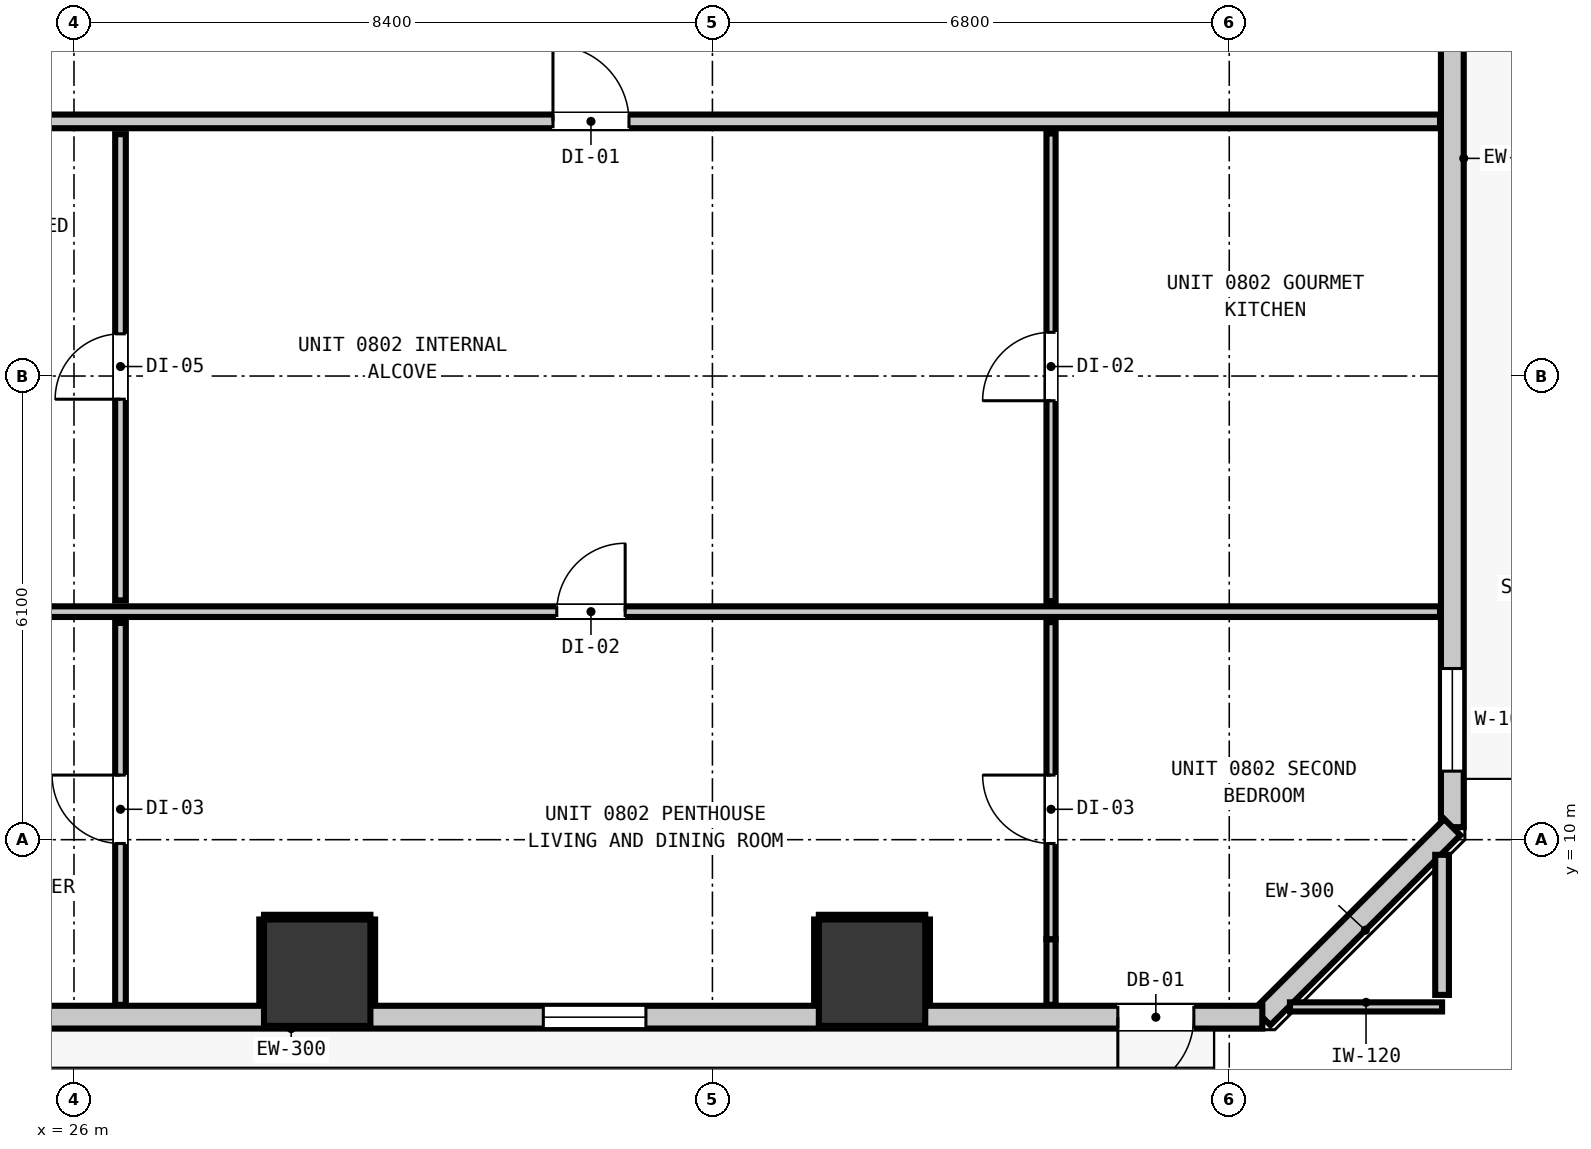
"""IFC4 building model, lengths in metres.
Left out: names, types, materials, properties, quantities, classifications, styles, units other than length and angle.
Written with IfcOpenShell. Run it as: python <this file> out.ifc"""

import sys

from ifc_helpers import new_model, si_unit, direction, frame, frame_2d, origin, origin_2d, place, context, subcontext, project, spatial, rectangle, extrude, element, fill, save


model = new_model("IFC4")
c1 = context("Model", 3, precision=1e-05, world=origin(), true_north=direction((0.0, 1.0)))
c2 = subcontext(c1, "Body", "Model", "MODEL_VIEW")
j1 = project(units=[si_unit("LENGTHUNIT", "METRE"), si_unit("PLANEANGLEUNIT", "RADIAN")], contexts=[c1])
p1 = place(None, origin())
s1 = spatial("IfcSite", under=j1, at=p1, CompositionType="ELEMENT")
p2 = place(p1, origin())
s2 = spatial("IfcBuilding", under=s1, at=p2, CompositionType="ELEMENT")
p3 = place(p2, frame((0.0, 0.0, 31.96)))
s3 = spatial("IfcBuildingStorey", under=s2, at=p3, CompositionType="ELEMENT", Elevation=31.96)
for number, where, z_axis, x_axis in (
    (1, (29.2, 8.25, 0.0), (0.0, 0.0, 1.0), (1.0, 0.0, 0.0)),
    (2, (36.5, 8.25, 0.0), (0.0, 0.0, 1.0), (1.0, 0.0, 0.0)),
):
    element("IfcColumn", number, at=place(p3, frame(where, z_axis=z_axis, x_axis=x_axis)), inside=s3, PredefinedType="COLUMN", context=c2, shape_type="SweptSolid", body=[
        extrude(rectangle(XDim=1.4, YDim=1.4, at=origin_2d()), origin(), (0.0, 0.0, 1.0), 3.32),
    ])
p4 = place(p3, frame((44.135, 44.835, 0.0), z_axis=(0.0, 0.0, 1.0), x_axis=(0.0, -1.0, 0.0)))
e3 = element("IfcWall", 3, at=p4, inside=s3, PredefinedType="STANDARD", context=c2, shape_type="SweptSolid", body=[
    extrude(rectangle(XDim=34.67, YDim=0.3, at=frame_2d((17.335, 0.0))), origin(), (0.0, 0.0, 1.0), 3.06),
])
p5 = place(p4, frame((1.251, 0.0, 0.0)))
e4 = element("IfcOpeningElement", 4, at=p5, cuts=e3, PredefinedType="OPENING", context=c2, shape_type="SweptSolid", body=[
    extrude(rectangle(XDim=1.0, YDim=2.15, at=frame_2d((0.5, 1.075))), frame((0.0, 0.16, 0.0), z_axis=(0.0, -1.0, 0.0), x_axis=(1.0, 0.0, 0.0)), (0.0, 0.0, 1.0), 0.32),
])
p6 = place(p4, frame((32.583, 0.0, 0.85)))
e5 = element("IfcOpeningElement", 5, at=p6, cuts=e3, PredefinedType="OPENING", context=c2, shape_type="SweptSolid", body=[
    extrude(rectangle(XDim=1.35, YDim=1.85, at=frame_2d((0.675, 0.925))), frame((0.0, 0.16, 0.0), z_axis=(0.0, -1.0, 0.0), x_axis=(1.0, 0.0, 0.0)), (0.0, 0.0, 1.0), 0.32),
])
p7 = place(p4, frame((17.81, 0.0, 0.85)))
e6 = element("IfcOpeningElement", 6, at=p7, cuts=e3, PredefinedType="OPENING", context=c2, shape_type="SweptSolid", body=[
    extrude(rectangle(XDim=1.35, YDim=1.85, at=frame_2d((0.675, 0.925))), frame((0.0, 0.16, 0.0), z_axis=(0.0, -1.0, 0.0), x_axis=(1.0, 0.0, 0.0)), (0.0, 0.0, 1.0), 0.32),
])
p8 = place(p4, frame((6.834, 0.0, 0.85)))
e7 = element("IfcOpeningElement", 7, at=p8, cuts=e3, PredefinedType="OPENING", context=c2, shape_type="SweptSolid", body=[
    extrude(rectangle(XDim=1.35, YDim=1.85, at=frame_2d((0.675, 0.925))), frame((0.0, 0.16, 0.0), z_axis=(0.0, -1.0, 0.0), x_axis=(1.0, 0.0, 0.0)), (0.0, 0.0, 1.0), 0.32),
])
p9 = place(p3, frame((44.135, 10.165, 0.0), z_axis=(0.0, 0.0, 1.0), x_axis=(-0.707106781187, -0.707106781187, 0.0)))
e8 = element("IfcWall", 8, at=p9, inside=s3, PredefinedType="STANDARD", context=c2, shape_type="SweptSolid", body=[
    extrude(rectangle(XDim=3.536, YDim=0.3, at=frame_2d((1.768, 0.0))), origin(), (0.0, 0.0, 1.0), 3.06),
])
p10 = place(p3, frame((41.635, 7.665, 0.0), z_axis=(0.0, 0.0, 1.0), x_axis=(-1.0, 0.0, 0.0)))
e9 = element("IfcWall", 9, at=p10, inside=s3, PredefinedType="STANDARD", context=c2, shape_type="SweptSolid", body=[
    extrude(rectangle(XDim=37.47, YDim=0.3, at=frame_2d((18.735, 0.0))), origin(), (0.0, 0.0, 1.0), 3.06),
])
p11 = place(p10, frame((0.901, 0.0, 0.0)))
e10 = element("IfcOpeningElement", 10, at=p11, cuts=e9, PredefinedType="OPENING", context=c2, shape_type="SweptSolid", body=[
    extrude(rectangle(XDim=1.0, YDim=2.15, at=frame_2d((0.5, 1.075))), frame((0.0, 0.16, 0.0), z_axis=(0.0, -1.0, 0.0), x_axis=(1.0, 0.0, 0.0)), (0.0, 0.0, 1.0), 0.32),
])
p12 = place(p10, frame((32.47, 0.0, 0.85)))
e11 = element("IfcOpeningElement", 11, at=p12, cuts=e9, PredefinedType="OPENING", context=c2, shape_type="SweptSolid", body=[
    extrude(rectangle(XDim=1.35, YDim=1.85, at=frame_2d((0.675, 0.925))), frame((0.0, 0.16, 0.0), z_axis=(0.0, -1.0, 0.0), x_axis=(1.0, 0.0, 0.0)), (0.0, 0.0, 1.0), 0.32),
])
p13 = place(p10, frame((36.621, 0.0, 0.85)))
e12 = element("IfcOpeningElement", 12, at=p13, cuts=e9, PredefinedType="OPENING", context=c2, shape_type="SweptSolid", body=[
    extrude(rectangle(XDim=0.58, YDim=1.5, at=frame_2d((0.29, 0.75))), frame((0.0, 0.16, 0.0), z_axis=(0.0, -1.0, 0.0), x_axis=(1.0, 0.0, 0.0)), (0.0, 0.0, 1.0), 0.32),
])
p14 = place(p10, frame((25.17, 0.0, 0.85)))
e13 = element("IfcOpeningElement", 13, at=p14, cuts=e9, PredefinedType="OPENING", context=c2, shape_type="SweptSolid", body=[
    extrude(rectangle(XDim=1.35, YDim=1.85, at=frame_2d((0.675, 0.925))), frame((0.0, 0.16, 0.0), z_axis=(0.0, -1.0, 0.0), x_axis=(1.0, 0.0, 0.0)), (0.0, 0.0, 1.0), 0.32),
])
p15 = place(p10, frame((22.07, 0.0, 0.85)))
e14 = element("IfcOpeningElement", 14, at=p15, cuts=e9, PredefinedType="OPENING", context=c2, shape_type="SweptSolid", body=[
    extrude(rectangle(XDim=1.35, YDim=1.85, at=frame_2d((0.675, 0.925))), frame((0.0, 0.16, 0.0), z_axis=(0.0, -1.0, 0.0), x_axis=(1.0, 0.0, 0.0)), (0.0, 0.0, 1.0), 0.32),
])
p16 = place(p10, frame((8.11, 0.0, 0.85)))
e15 = element("IfcOpeningElement", 15, at=p16, cuts=e9, PredefinedType="OPENING", context=c2, shape_type="SweptSolid", body=[
    extrude(rectangle(XDim=1.35, YDim=1.85, at=frame_2d((0.675, 0.925))), frame((0.0, 0.16, 0.0), z_axis=(0.0, -1.0, 0.0), x_axis=(1.0, 0.0, 0.0)), (0.0, 0.0, 1.0), 0.32),
])
p17 = place(p10, frame((16.094, 0.0, 0.85)))
e16 = element("IfcOpeningElement", 16, at=p17, cuts=e9, PredefinedType="OPENING", context=c2, shape_type="SweptSolid", body=[
    extrude(rectangle(XDim=1.35, YDim=1.85, at=frame_2d((0.675, 0.925))), frame((0.0, 0.16, 0.0), z_axis=(0.0, -1.0, 0.0), x_axis=(1.0, 0.0, 0.0)), (0.0, 0.0, 1.0), 0.32),
])
p18 = place(p3, frame((1.827, 19.45, 0.0), z_axis=(0.0, 0.0, 1.0), x_axis=(1.0, 0.0, 0.0)))
e17 = element("IfcWall", 17, at=p18, inside=s3, PredefinedType="PARTITIONING", context=c2, shape_type="SweptSolid", body=[
    extrude(rectangle(XDim=42.146, YDim=0.18, at=frame_2d((21.073, 0.0))), origin(), (0.0, 0.0, 1.0), 3.06),
])
p19 = place(p18, frame((8.602, 0.0, 0.0)))
e18 = element("IfcOpeningElement", 18, at=p19, cuts=e17, PredefinedType="OPENING", context=c2, shape_type="SweptSolid", body=[
    extrude(rectangle(XDim=1.0, YDim=2.15, at=frame_2d((0.5, 1.075))), frame((0.0, 0.1, 0.0), z_axis=(0.0, -1.0, 0.0), x_axis=(1.0, 0.0, 0.0)), (0.0, 0.0, 1.0), 0.2),
])
p20 = place(p18, frame((30.475, 0.0, 0.0)))
e19 = element("IfcOpeningElement", 19, at=p20, cuts=e17, PredefinedType="OPENING", context=c2, shape_type="SweptSolid", body=[
    extrude(rectangle(XDim=1.0, YDim=2.15, at=frame_2d((0.5, 1.075))), frame((0.0, 0.1, 0.0), z_axis=(0.0, -1.0, 0.0), x_axis=(1.0, 0.0, 0.0)), (0.0, 0.0, 1.0), 0.2),
])
p21 = place(p3, frame((11.688, 13.0, 0.0), z_axis=(0.0, 0.0, 1.0), x_axis=(1.0, 0.0, 0.0)))
e20 = element("IfcWall", 20, at=p21, inside=s3, PredefinedType="PARTITIONING", context=c2, shape_type="SweptSolid", body=[
    extrude(rectangle(XDim=32.285, YDim=0.14, at=frame_2d((16.143, 0.0))), origin(), (0.0, 0.0, 1.0), 3.06),
])
p22 = place(p21, frame((20.664, 0.0, 0.0)))
e21 = element("IfcOpeningElement", 21, at=p22, cuts=e20, PredefinedType="OPENING", context=c2, shape_type="SweptSolid", body=[
    extrude(rectangle(XDim=0.9, YDim=2.1, at=frame_2d((0.45, 1.05))), frame((0.0, 0.08, 0.0), z_axis=(0.0, -1.0, 0.0), x_axis=(1.0, 0.0, 0.0)), (0.0, 0.0, 1.0), 0.16),
])
p23 = place(p3, frame((41.999, 7.8, 0.0), z_axis=(0.0, 0.0, 1.0), x_axis=(1.0, 0.0, 0.0)))
e22 = element("IfcWall", 22, at=p23, inside=s3, PredefinedType="PARTITIONING", context=c2, shape_type="SweptSolid", body=[
    extrude(rectangle(XDim=2.001, YDim=0.12, at=frame_2d((1.0, 0.0))), origin(), (0.0, 0.0, 1.0), 3.06),
])
p24 = place(p3, frame((44.0, 7.958, 0.0), z_axis=(0.0, 0.0, 1.0), x_axis=(0.0, 1.0, 0.0)))
e23 = element("IfcWall", 23, at=p24, inside=s3, PredefinedType="PARTITIONING", context=c2, shape_type="SweptSolid", body=[
    extrude(rectangle(XDim=1.843, YDim=0.18, at=frame_2d((0.921, 0.0))), origin(), (0.0, 0.0, 1.0), 3.06),
])
p25 = place(p3, frame((26.612, 7.827, 0.0), z_axis=(0.0, 0.0, 1.0), x_axis=(0.0, 1.0, 0.0)))
e24 = element("IfcWall", 24, at=p25, inside=s3, PredefinedType="PARTITIONING", context=c2, shape_type="SweptSolid", body=[
    extrude(rectangle(XDim=5.025, YDim=0.14, at=frame_2d((2.513, 0.0))), origin(), (0.0, 0.0, 1.0), 3.06),
])
p26 = place(p25, frame((2.123, 0.0, 0.0)))
e25 = element("IfcOpeningElement", 25, at=p26, cuts=e24, PredefinedType="OPENING", context=c2, shape_type="SweptSolid", body=[
    extrude(rectangle(XDim=0.9, YDim=2.1, at=frame_2d((0.45, 1.05))), frame((0.0, 0.08, 0.0), z_axis=(0.0, -1.0, 0.0), x_axis=(1.0, 0.0, 0.0)), (0.0, 0.0, 1.0), 0.16),
])
p27 = place(p3, frame((26.612, 13.148, 0.0), z_axis=(0.0, 0.0, 1.0), x_axis=(0.0, 1.0, 0.0)))
e26 = element("IfcWall", 26, at=p27, inside=s3, PredefinedType="PARTITIONING", context=c2, shape_type="SweptSolid", body=[
    extrude(rectangle(XDim=6.134, YDim=0.14, at=frame_2d((3.067, 0.0))), origin(), (0.0, 0.0, 1.0), 3.06),
])
p28 = place(p27, frame((2.647, 0.0, 0.0)))
e27 = element("IfcOpeningElement", 27, at=p28, cuts=e26, PredefinedType="OPENING", context=c2, shape_type="SweptSolid", body=[
    extrude(rectangle(XDim=0.86, YDim=2.02, at=frame_2d((0.43, 1.01))), frame((0.0, 0.08, 0.0), z_axis=(0.0, -1.0, 0.0), x_axis=(1.0, 0.0, 0.0)), (0.0, 0.0, 1.0), 0.16),
])
p29 = place(p3, frame((38.855, 7.827, 0.0), z_axis=(0.0, 0.0, 1.0), x_axis=(0.0, 1.0, 0.0)))
e28 = element("IfcWall", 28, at=p29, inside=s3, PredefinedType="PARTITIONING", context=c2, shape_type="SweptSolid", body=[
    extrude(rectangle(XDim=0.864, YDim=0.12, at=frame_2d((0.432, 0.0))), origin(), (0.0, 0.0, 1.0), 3.06),
])
p30 = place(p3, frame((38.855, 8.691, 0.0), z_axis=(0.0, 0.0, 1.0), x_axis=(0.0, 1.0, 0.0)))
e29 = element("IfcWall", 29, at=p30, inside=s3, PredefinedType="PARTITIONING", context=c2, shape_type="SweptSolid", body=[
    extrude(rectangle(XDim=4.171, YDim=0.12, at=frame_2d((2.085, 0.0))), origin(), (0.0, 0.0, 1.0), 2.445),
])
p31 = place(p30, frame((1.259, 0.0, 0.0)))
e30 = element("IfcOpeningElement", 30, at=p31, cuts=e29, PredefinedType="OPENING", context=c2, shape_type="SweptSolid", body=[
    extrude(rectangle(XDim=0.9, YDim=2.1, at=frame_2d((0.45, 1.05))), frame((0.0, 0.07, 0.0), z_axis=(0.0, -1.0, 0.0), x_axis=(1.0, 0.0, 0.0)), (0.0, 0.0, 1.0), 0.14),
])
p32 = place(p3, frame((38.855, 13.138, 0.0), z_axis=(0.0, 0.0, 1.0), x_axis=(0.0, 1.0, 0.0)))
e31 = element("IfcWall", 31, at=p32, inside=s3, PredefinedType="PARTITIONING", context=c2, shape_type="SweptSolid", body=[
    extrude(rectangle(XDim=6.154, YDim=0.12, at=frame_2d((3.077, 0.0))), origin(), (0.0, 0.0, 1.0), 2.445),
])
p33 = place(p32, frame((2.637, 0.0, 0.0)))
e32 = element("IfcOpeningElement", 32, at=p33, cuts=e31, PredefinedType="OPENING", context=c2, shape_type="SweptSolid", body=[
    extrude(rectangle(XDim=0.9, YDim=2.1, at=frame_2d((0.45, 1.05))), frame((0.0, 0.07, 0.0), z_axis=(0.0, -1.0, 0.0), x_axis=(1.0, 0.0, 0.0)), (0.0, 0.0, 1.0), 0.14),
])
p34 = place(p3, frame((28.5, 8.982, 0.0), z_axis=(0.0, 0.0, 1.0), x_axis=(1.0, 0.0, 0.0)))
e33 = element("IfcWall", 33, at=p34, inside=s3, PredefinedType="PARTITIONING", context=c2, shape_type="SweptSolid", body=[
    extrude(rectangle(XDim=1.4, YDim=0.06, at=frame_2d((0.7, 0.0))), origin(), (0.0, 0.0, 1.0), 1.45),
])
for number, where, z_axis, x_axis in (
    (34, (28.468, 7.83, 0.0), (0.0, 0.0, 1.0), (0.0, 1.0, 0.0)),
    (35, (29.932, 7.83, 0.0), (0.0, 0.0, 1.0), (0.0, 1.0, 0.0)),
):
    element("IfcWall", number, at=place(p3, frame(where, z_axis=z_axis, x_axis=x_axis)), inside=s3, PredefinedType="PARTITIONING", context=c2, shape_type="SweptSolid", body=[
        extrude(rectangle(XDim=1.12, YDim=0.06, at=frame_2d((0.56, 0.0))), origin(), (0.0, 0.0, 1.0), 1.45),
    ])
p35 = place(p3, frame((35.8, 8.982, 0.0), z_axis=(0.0, 0.0, 1.0), x_axis=(1.0, 0.0, 0.0)))
e36 = element("IfcWall", 36, at=p35, inside=s3, PredefinedType="PARTITIONING", context=c2, shape_type="SweptSolid", body=[
    extrude(rectangle(XDim=1.4, YDim=0.06, at=frame_2d((0.7, 0.0))), origin(), (0.0, 0.0, 1.0), 1.45),
])
for number, where, z_axis, x_axis in (
    (37, (35.768, 7.83, 0.0), (0.0, 0.0, 1.0), (0.0, 1.0, 0.0)),
    (38, (37.232, 7.83, 0.0), (0.0, 0.0, 1.0), (0.0, 1.0, 0.0)),
):
    element("IfcWall", number, at=place(p3, frame(where, z_axis=z_axis, x_axis=x_axis)), inside=s3, PredefinedType="PARTITIONING", context=c2, shape_type="SweptSolid", body=[
        extrude(rectangle(XDim=1.12, YDim=0.06, at=frame_2d((0.56, 0.0))), origin(), (0.0, 0.0, 1.0), 1.45),
    ])
p36 = place(p11, origin())
e39 = element("IfcDoor", 39, at=p36, inside=s3, OperationType="SINGLE_SWING_RIGHT", PredefinedType="DOOR", context=c2, shape_type="SweptSolid", body=[
    extrude(rectangle(XDim=1.0, YDim=2.15, at=frame_2d((0.5, 1.075))), frame((0.0, 0.025, 0.0), z_axis=(0.0, -1.0, 0.0), x_axis=(1.0, 0.0, 0.0)), (0.0, 0.0, 1.0), 0.05),
])
fill(e10, e39)
p37 = place(p6, origin())
e40 = element("IfcWindow", 40, at=p37, inside=s3, PartitioningType="SINGLE_PANEL", PredefinedType="WINDOW", context=c2, shape_type="SweptSolid", body=[
    extrude(rectangle(XDim=1.35, YDim=1.85, at=frame_2d((0.675, 0.925))), frame((0.0, 0.03, 0.0), z_axis=(0.0, -1.0, 0.0), x_axis=(1.0, 0.0, 0.0)), (0.0, 0.0, 1.0), 0.06),
])
fill(e5, e40)
p38 = place(p16, origin())
e41 = element("IfcWindow", 41, at=p38, inside=s3, PartitioningType="SINGLE_PANEL", PredefinedType="WINDOW", context=c2, shape_type="SweptSolid", body=[
    extrude(rectangle(XDim=1.35, YDim=1.85, at=frame_2d((0.675, 0.925))), frame((0.0, 0.03, 0.0), z_axis=(0.0, -1.0, 0.0), x_axis=(1.0, 0.0, 0.0)), (0.0, 0.0, 1.0), 0.06),
])
fill(e15, e41)
p39 = place(p20, origin())
e42 = element("IfcDoor", 42, at=p39, inside=s3, OperationType="SINGLE_SWING_LEFT", PredefinedType="DOOR", context=c2, shape_type="SweptSolid", body=[
    extrude(rectangle(XDim=1.0, YDim=2.15, at=frame_2d((0.5, 1.075))), frame((0.0, 0.025, 0.0), z_axis=(0.0, -1.0, 0.0), x_axis=(1.0, 0.0, 0.0)), (0.0, 0.0, 1.0), 0.05),
])
fill(e19, e42)
p40 = place(p22, origin())
e43 = element("IfcDoor", 43, at=p40, inside=s3, OperationType="SINGLE_SWING_RIGHT", PredefinedType="DOOR", context=c2, shape_type="SweptSolid", body=[
    extrude(rectangle(XDim=0.9, YDim=2.1, at=frame_2d((0.45, 1.05))), frame((0.0, 0.025, 0.0), z_axis=(0.0, -1.0, 0.0), x_axis=(1.0, 0.0, 0.0)), (0.0, 0.0, 1.0), 0.05),
])
fill(e21, e43)
p41 = place(p28, origin())
e44 = element("IfcDoor", 44, at=p41, inside=s3, OperationType="SINGLE_SWING_LEFT", PredefinedType="DOOR", context=c2, shape_type="SweptSolid", body=[
    extrude(rectangle(XDim=0.86, YDim=2.02, at=frame_2d((0.43, 1.01))), frame((0.0, 0.025, 0.0), z_axis=(0.0, -1.0, 0.0), x_axis=(1.0, 0.0, 0.0)), (0.0, 0.0, 1.0), 0.05),
])
fill(e27, e44)
p42 = place(p26, origin())
e45 = element("IfcDoor", 45, at=p42, inside=s3, OperationType="SINGLE_SWING_RIGHT", PredefinedType="DOOR", context=c2, shape_type="SweptSolid", body=[
    extrude(rectangle(XDim=0.9, YDim=2.1, at=frame_2d((0.45, 1.05))), frame((0.0, 0.025, 0.0), z_axis=(0.0, -1.0, 0.0), x_axis=(1.0, 0.0, 0.0)), (0.0, 0.0, 1.0), 0.05),
])
fill(e25, e45)
p43 = place(p33, origin())
e46 = element("IfcDoor", 46, at=p43, inside=s3, OperationType="SINGLE_SWING_LEFT", PredefinedType="DOOR", context=c2, shape_type="SweptSolid", body=[
    extrude(rectangle(XDim=0.9, YDim=2.1, at=frame_2d((0.45, 1.05))), frame((0.0, 0.025, 0.0), z_axis=(0.0, -1.0, 0.0), x_axis=(1.0, 0.0, 0.0)), (0.0, 0.0, 1.0), 0.05),
])
fill(e32, e46)
p44 = place(p31, origin())
e47 = element("IfcDoor", 47, at=p44, inside=s3, OperationType="SINGLE_SWING_RIGHT", PredefinedType="DOOR", context=c2, shape_type="SweptSolid", body=[
    extrude(rectangle(XDim=0.9, YDim=2.1, at=frame_2d((0.45, 1.05))), frame((0.0, 0.025, 0.0), z_axis=(0.0, -1.0, 0.0), x_axis=(1.0, 0.0, 0.0)), (0.0, 0.0, 1.0), 0.05),
])
fill(e30, e47)
save(model, sys.argv[1])
